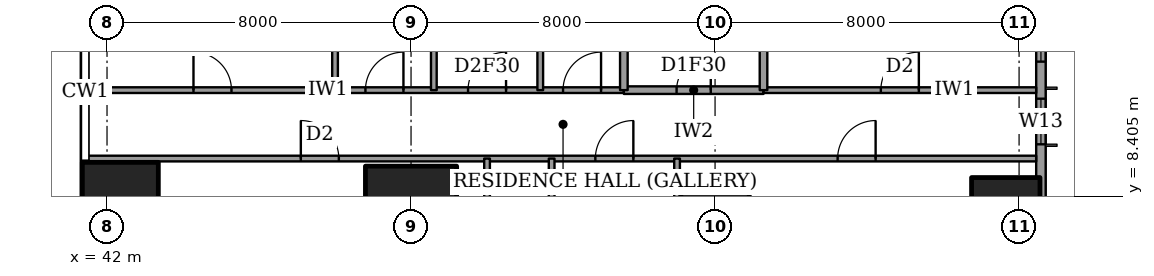
"""IFC4 building model, lengths in metres.
Left out: names, types, materials, properties, quantities, classifications, styles, units other than length and angle.
Written with IfcOpenShell. Run it as: python <this file> out.ifc"""

import sys

from ifc_helpers import new_model, si_unit, direction, frame, frame_2d, origin, origin_2d, place, context, subcontext, project, spatial, rectangle, extrude, element, fill, save


model = new_model("IFC4")
c1 = context("Model", 3, precision=1e-05, world=origin(), true_north=direction((0.0, 1.0)))
c2 = subcontext(c1, "Body", "Model", "MODEL_VIEW")
j1 = project(units=[si_unit("LENGTHUNIT", "METRE"), si_unit("PLANEANGLEUNIT", "RADIAN")], contexts=[c1])
p1 = place(None, origin())
s1 = spatial("IfcSite", under=j1, at=p1, CompositionType="ELEMENT")
p2 = place(p1, origin())
s2 = spatial("IfcBuilding", under=s1, at=p2, CompositionType="ELEMENT")
p3 = place(p2, frame((0.0, 0.0, 203.8)))
s3 = spatial("IfcBuildingStorey", under=s2, at=p3, CompositionType="ELEMENT", Elevation=203.8)
p4 = place(p3, frame((42.35, 8.0, 0.0), z_axis=(0.0, 0.0, 1.0), x_axis=(1.0, 0.0, 0.0)))
e1 = element("IfcColumn", 1, at=p4, inside=s3, PredefinedType="COLUMN", context=c2, shape_type="SweptSolid", body=[
    extrude(rectangle(XDim=2.0, YDim=2.6, at=origin_2d()), origin(), (0.0, 0.0, 1.0), 3.6),
])
p5 = place(p3, frame((50.0, 8.0, 0.0), z_axis=(0.0, 0.0, 1.0), x_axis=(1.0, 0.0, 0.0)))
e2 = element("IfcColumn", 2, at=p5, inside=s3, PredefinedType="COLUMN", context=c2, shape_type="SweptSolid", body=[
    extrude(rectangle(XDim=2.4, YDim=2.4, at=origin_2d()), origin(), (0.0, 0.0, 1.0), 3.6),
])
for number, where, z_axis, x_axis in (
    (3, (58.0, 8.0, 0.0), (0.0, 0.0, 1.0), (1.0, 0.0, 0.0)),
    (4, (65.65, 8.0, 0.0), (0.0, 0.0, 1.0), (1.0, 0.0, 0.0)),
):
    element("IfcColumn", number, at=place(p3, frame(where, z_axis=z_axis, x_axis=x_axis)), inside=s3, PredefinedType="COLUMN", context=c2, shape_type="SweptSolid", body=[
        extrude(rectangle(XDim=1.8, YDim=1.8, at=origin_2d()), origin(), (0.0, 0.0, 1.0), 3.6),
    ])
p6 = place(p3, frame((66.575, 3.175, 0.0), z_axis=(0.0, 0.0, 1.0), x_axis=(0.0, 1.0, 0.0)))
e5 = element("IfcWall", 5, at=p6, inside=s3, PredefinedType="SOLIDWALL", context=c2, shape_type="SweptSolid", body=[
    extrude(rectangle(XDim=41.65, YDim=0.25, at=frame_2d((20.825, 0.0))), origin(), (0.0, 0.0, 1.0), 3.6),
])
p7 = place(p6, frame((0.825, 0.0, 0.2)))
e6 = element("IfcOpeningElement", 6, at=p7, cuts=e5, PredefinedType="OPENING", context=c2, shape_type="SweptSolid", body=[
    extrude(rectangle(XDim=2.4, YDim=2.4, at=frame_2d((1.2, 1.2))), frame((0.0, 0.135, 0.0), z_axis=(0.0, -1.0, 0.0), x_axis=(1.0, 0.0, 0.0)), (0.0, 0.0, 1.0), 0.27),
])
p8 = place(p6, frame((6.6, 0.0, 0.2)))
e7 = element("IfcOpeningElement", 7, at=p8, cuts=e5, PredefinedType="OPENING", context=c2, shape_type="SweptSolid", body=[
    extrude(rectangle(XDim=1.2, YDim=2.4, at=frame_2d((0.6, 1.2))), frame((0.0, 0.135, 0.0), z_axis=(0.0, -1.0, 0.0), x_axis=(1.0, 0.0, 0.0)), (0.0, 0.0, 1.0), 0.27),
])
p9 = place(p6, frame((8.775, 0.0, 0.2)))
e8 = element("IfcOpeningElement", 8, at=p9, cuts=e5, PredefinedType="OPENING", context=c2, shape_type="SweptSolid", body=[
    extrude(rectangle(XDim=2.4, YDim=2.4, at=frame_2d((1.2, 1.2))), frame((0.0, 0.135, 0.0), z_axis=(0.0, -1.0, 0.0), x_axis=(1.0, 0.0, 0.0)), (0.0, 0.0, 1.0), 0.27),
])
p10 = place(p6, frame((15.675, 0.0, 0.2)))
e9 = element("IfcOpeningElement", 9, at=p10, cuts=e5, PredefinedType="OPENING", context=c2, shape_type="SweptSolid", body=[
    extrude(rectangle(XDim=2.4, YDim=2.4, at=frame_2d((1.2, 1.2))), frame((0.0, 0.135, 0.0), z_axis=(0.0, -1.0, 0.0), x_axis=(1.0, 0.0, 0.0)), (0.0, 0.0, 1.0), 0.27),
])
p11 = place(p6, frame((23.575, 0.0, 0.2)))
e10 = element("IfcOpeningElement", 10, at=p11, cuts=e5, PredefinedType="OPENING", context=c2, shape_type="SweptSolid", body=[
    extrude(rectangle(XDim=2.4, YDim=2.4, at=frame_2d((1.2, 1.2))), frame((0.0, 0.135, 0.0), z_axis=(0.0, -1.0, 0.0), x_axis=(1.0, 0.0, 0.0)), (0.0, 0.0, 1.0), 0.27),
])
p12 = place(p6, frame((30.675, 0.0, 0.2)))
e11 = element("IfcOpeningElement", 11, at=p12, cuts=e5, PredefinedType="OPENING", context=c2, shape_type="SweptSolid", body=[
    extrude(rectangle(XDim=2.4, YDim=2.4, at=frame_2d((1.2, 1.2))), frame((0.0, 0.135, 0.0), z_axis=(0.0, -1.0, 0.0), x_axis=(1.0, 0.0, 0.0)), (0.0, 0.0, 1.0), 0.27),
])
p13 = place(p6, frame((34.325, 0.0, 0.2)))
e12 = element("IfcOpeningElement", 12, at=p13, cuts=e5, PredefinedType="OPENING", context=c2, shape_type="SweptSolid", body=[
    extrude(rectangle(XDim=1.2, YDim=2.4, at=frame_2d((0.6, 1.2))), frame((0.0, 0.135, 0.0), z_axis=(0.0, -1.0, 0.0), x_axis=(1.0, 0.0, 0.0)), (0.0, 0.0, 1.0), 0.27),
])
p14 = place(p6, frame((38.425, 0.0, 0.2)))
e13 = element("IfcOpeningElement", 13, at=p14, cuts=e5, PredefinedType="OPENING", context=c2, shape_type="SweptSolid", body=[
    extrude(rectangle(XDim=2.4, YDim=2.4, at=frame_2d((1.2, 1.2))), frame((0.0, 0.135, 0.0), z_axis=(0.0, -1.0, 0.0), x_axis=(1.0, 0.0, 0.0)), (0.0, 0.0, 1.0), 0.27),
])
p15 = place(p3, frame((41.439, 9.4, 0.0), z_axis=(0.0, 0.0, 1.0), x_axis=(1.0, 0.0, 0.0)))
e14 = element("IfcWall", 14, at=p15, inside=s3, PredefinedType="PARTITIONING", context=c2, shape_type="SweptSolid", body=[
    extrude(rectangle(XDim=25.011, YDim=0.15, at=frame_2d((12.505, 0.0))), origin(), (0.0, 0.0, 1.0), 3.35),
])
p16 = place(p15, frame((19.786, 0.0, 0.0)))
e15 = element("IfcOpeningElement", 15, at=p16, cuts=e14, PredefinedType="OPENING", context=c2, shape_type="SweptSolid", body=[
    extrude(rectangle(XDim=1.0, YDim=2.1, at=frame_2d((0.5, 1.05))), frame((0.0, 0.085, 0.0), z_axis=(0.0, -1.0, 0.0), x_axis=(1.0, 0.0, 0.0)), (0.0, 0.0, 1.0), 0.17),
])
p17 = place(p15, frame((13.411, 0.0, 0.0)))
e16 = element("IfcOpeningElement", 16, at=p17, cuts=e14, PredefinedType="OPENING", context=c2, shape_type="SweptSolid", body=[
    extrude(rectangle(XDim=1.0, YDim=2.1, at=frame_2d((0.5, 1.05))), frame((0.0, 0.085, 0.0), z_axis=(0.0, -1.0, 0.0), x_axis=(1.0, 0.0, 0.0)), (0.0, 0.0, 1.0), 0.17),
])
p18 = place(p15, frame((5.661, 0.0, 0.0)))
e17 = element("IfcOpeningElement", 17, at=p18, cuts=e14, PredefinedType="OPENING", context=c2, shape_type="SweptSolid", body=[
    extrude(rectangle(XDim=1.0, YDim=2.1, at=frame_2d((0.5, 1.05))), frame((0.0, 0.085, 0.0), z_axis=(0.0, -1.0, 0.0), x_axis=(1.0, 0.0, 0.0)), (0.0, 0.0, 1.0), 0.17),
])
p19 = place(p3, frame((55.6, 11.2, 0.0), z_axis=(0.0, 0.0, 1.0), x_axis=(1.0, 0.0, 0.0)))
e18 = element("IfcWall", 18, at=p19, inside=s3, PredefinedType="PARTITIONING", context=c2, shape_type="SweptSolid", body=[
    extrude(rectangle(XDim=3.675, YDim=0.2, at=frame_2d((1.837, 0.0))), origin(), (0.0, 0.0, 1.0), 3.35),
])
p20 = place(p19, frame((1.387, 0.0, 0.0)))
e19 = element("IfcOpeningElement", 19, at=p20, cuts=e18, PredefinedType="OPENING", context=c2, shape_type="SweptSolid", body=[
    extrude(rectangle(XDim=0.9, YDim=2.1, at=frame_2d((0.45, 1.05))), frame((0.0, 0.11, 0.0), z_axis=(0.0, -1.0, 0.0), x_axis=(1.0, 0.0, 0.0)), (0.0, 0.0, 1.0), 0.22),
])
p21 = place(p3, frame((41.439, 11.2, 0.0), z_axis=(0.0, 0.0, 1.0), x_axis=(1.0, 0.0, 0.0)))
e20 = element("IfcWall", 20, at=p21, inside=s3, PredefinedType="PARTITIONING", context=c2, shape_type="SweptSolid", body=[
    extrude(rectangle(XDim=14.161, YDim=0.15, at=frame_2d((7.081, 0.0))), origin(), (0.0, 0.0, 1.0), 3.35),
])
p22 = place(p21, frame((12.561, 0.0, 0.0)))
e21 = element("IfcOpeningElement", 21, at=p22, cuts=e20, PredefinedType="OPENING", context=c2, shape_type="SweptSolid", body=[
    extrude(rectangle(XDim=1.0, YDim=2.1, at=frame_2d((0.5, 1.05))), frame((0.0, 0.085, 0.0), z_axis=(0.0, -1.0, 0.0), x_axis=(1.0, 0.0, 0.0)), (0.0, 0.0, 1.0), 0.17),
])
p23 = place(p21, frame((10.061, 0.0, 0.0)))
e22 = element("IfcOpeningElement", 22, at=p23, cuts=e20, PredefinedType="OPENING", context=c2, shape_type="SweptSolid", body=[
    extrude(rectangle(XDim=1.0, YDim=2.1, at=frame_2d((0.5, 1.05))), frame((0.0, 0.085, 0.0), z_axis=(0.0, -1.0, 0.0), x_axis=(1.0, 0.0, 0.0)), (0.0, 0.0, 1.0), 0.17),
])
p24 = place(p21, frame((7.361, 0.0, 0.0)))
e23 = element("IfcOpeningElement", 23, at=p24, cuts=e20, PredefinedType="OPENING", context=c2, shape_type="SweptSolid", body=[
    extrude(rectangle(XDim=1.0, YDim=2.1, at=frame_2d((0.5, 1.05))), frame((0.0, 0.085, 0.0), z_axis=(0.0, -1.0, 0.0), x_axis=(1.0, 0.0, 0.0)), (0.0, 0.0, 1.0), 0.17),
])
p25 = place(p21, frame((2.836, 0.0, 0.0)))
e24 = element("IfcOpeningElement", 24, at=p25, cuts=e20, PredefinedType="OPENING", context=c2, shape_type="SweptSolid", body=[
    extrude(rectangle(XDim=1.0, YDim=2.1, at=frame_2d((0.5, 1.05))), frame((0.0, 0.085, 0.0), z_axis=(0.0, -1.0, 0.0), x_axis=(1.0, 0.0, 0.0)), (0.0, 0.0, 1.0), 0.17),
])
p26 = place(p3, frame((59.275, 11.2, 0.0), z_axis=(0.0, 0.0, 1.0), x_axis=(1.0, 0.0, 0.0)))
e25 = element("IfcWall", 25, at=p26, inside=s3, PredefinedType="PARTITIONING", context=c2, shape_type="SweptSolid", body=[
    extrude(rectangle(XDim=7.175, YDim=0.15, at=frame_2d((3.587, 0.0))), origin(), (0.0, 0.0, 1.0), 3.35),
])
p27 = place(p26, frame((3.087, 0.0, 0.0)))
e26 = element("IfcOpeningElement", 26, at=p27, cuts=e25, PredefinedType="OPENING", context=c2, shape_type="SweptSolid", body=[
    extrude(rectangle(XDim=1.0, YDim=2.1, at=frame_2d((0.5, 1.05))), frame((0.0, 0.085, 0.0), z_axis=(0.0, -1.0, 0.0), x_axis=(1.0, 0.0, 0.0)), (0.0, 0.0, 1.0), 0.17),
])
p28 = place(p3, frame((48.0, 11.2, 0.0), z_axis=(0.0, 0.0, 1.0), x_axis=(0.0, 1.0, 0.0)))
e27 = element("IfcWall", 27, at=p28, inside=s3, PredefinedType="PARTITIONING", context=c2, shape_type="SweptSolid", body=[
    extrude(rectangle(XDim=6.8, YDim=0.15, at=frame_2d((3.4, 0.0))), origin(), (0.0, 0.0, 1.0), 3.35),
])
p29 = place(p3, frame((50.6, 11.2, 0.0), z_axis=(0.0, 0.0, 1.0), x_axis=(0.0, 1.0, 0.0)))
e28 = element("IfcWall", 28, at=p29, inside=s3, PredefinedType="PARTITIONING", context=c2, shape_type="SweptSolid", body=[
    extrude(rectangle(XDim=3.6, YDim=0.15, at=frame_2d((1.8, 0.0))), origin(), (0.0, 0.0, 1.0), 3.35),
])
p30 = place(p3, frame((52.0, -0.45, 0.0), z_axis=(0.0, 0.0, 1.0), x_axis=(0.0, 1.0, 0.0)))
e29 = element("IfcWall", 29, at=p30, inside=s3, PredefinedType="PARTITIONING", context=c2, shape_type="SweptSolid", body=[
    extrude(rectangle(XDim=9.85, YDim=0.15, at=frame_2d((4.925, 0.0))), origin(), (0.0, 0.0, 1.0), 3.35),
])
p31 = place(p3, frame((53.4, 11.2, 0.0), z_axis=(0.0, 0.0, 1.0), x_axis=(0.0, 1.0, 0.0)))
e30 = element("IfcWall", 30, at=p31, inside=s3, PredefinedType="PARTITIONING", context=c2, shape_type="SweptSolid", body=[
    extrude(rectangle(XDim=6.8, YDim=0.15, at=frame_2d((3.4, 0.0))), origin(), (0.0, 0.0, 1.0), 3.35),
])
p32 = place(p3, frame((53.7, -0.45, 0.0), z_axis=(0.0, 0.0, 1.0), x_axis=(0.0, 1.0, 0.0)))
e31 = element("IfcWall", 31, at=p32, inside=s3, PredefinedType="PARTITIONING", context=c2, shape_type="SweptSolid", body=[
    extrude(rectangle(XDim=9.85, YDim=0.15, at=frame_2d((4.925, 0.0))), origin(), (0.0, 0.0, 1.0), 3.35),
])
p33 = place(p32, frame((4.475, 0.0, 0.0)))
e32 = element("IfcOpeningElement", 32, at=p33, cuts=e31, PredefinedType="OPENING", context=c2, shape_type="SweptSolid", body=[
    extrude(rectangle(XDim=0.9, YDim=2.1, at=frame_2d((0.45, 1.05))), frame((0.0, 0.085, 0.0), z_axis=(0.0, -1.0, 0.0), x_axis=(1.0, 0.0, 0.0)), (0.0, 0.0, 1.0), 0.17),
])
p34 = place(p3, frame((55.6, 11.2, 0.0), z_axis=(0.0, 0.0, 1.0), x_axis=(0.0, 1.0, 0.0)))
e33 = element("IfcWall", 33, at=p34, inside=s3, PredefinedType="PARTITIONING", context=c2, shape_type="SweptSolid", body=[
    extrude(rectangle(XDim=3.4, YDim=0.2, at=frame_2d((1.7, 0.0))), origin(), (0.0, 0.0, 1.0), 3.35),
])
p35 = place(p3, frame((57.0, -0.45, 0.0), z_axis=(0.0, 0.0, 1.0), x_axis=(0.0, 1.0, 0.0)))
e34 = element("IfcWall", 34, at=p35, inside=s3, PredefinedType="PARTITIONING", context=c2, shape_type="SweptSolid", body=[
    extrude(rectangle(XDim=9.85, YDim=0.15, at=frame_2d((4.925, 0.0))), origin(), (0.0, 0.0, 1.0), 3.35),
])
p36 = place(p3, frame((59.275, 11.2, 0.0), z_axis=(0.0, 0.0, 1.0), x_axis=(0.0, 1.0, 0.0)))
e35 = element("IfcWall", 35, at=p36, inside=s3, PredefinedType="PARTITIONING", context=c2, shape_type="SweptSolid", body=[
    extrude(rectangle(XDim=3.4, YDim=0.2, at=frame_2d((1.7, 0.0))), origin(), (0.0, 0.0, 1.0), 3.35),
])
p37 = place(p8, origin())
e36 = element("IfcWindow", 36, at=p37, inside=s3, PartitioningType="SINGLE_PANEL", PredefinedType="WINDOW", context=c2, shape_type="SweptSolid", body=[
    extrude(rectangle(XDim=1.2, YDim=2.4, at=frame_2d((0.6, 1.2))), frame((0.0, 0.03, 0.0), z_axis=(0.0, -1.0, 0.0), x_axis=(1.0, 0.0, 0.0)), (0.0, 0.0, 1.0), 0.06),
])
fill(e7, e36)
p38 = place(p9, origin())
e37 = element("IfcWindow", 37, at=p38, inside=s3, PartitioningType="SINGLE_PANEL", PredefinedType="WINDOW", context=c2, shape_type="SweptSolid", body=[
    extrude(rectangle(XDim=2.4, YDim=2.4, at=frame_2d((1.2, 1.2))), frame((0.0, 0.03, 0.0), z_axis=(0.0, -1.0, 0.0), x_axis=(1.0, 0.0, 0.0)), (0.0, 0.0, 1.0), 0.06),
])
fill(e8, e37)
p39 = place(p16, origin())
e38 = element("IfcDoor", 38, at=p39, inside=s3, OperationType="SINGLE_SWING_LEFT", PredefinedType="DOOR", context=c2, shape_type="SweptSolid", body=[
    extrude(rectangle(XDim=1.0, YDim=2.1, at=frame_2d((0.5, 1.05))), frame((0.0, 0.025, 0.0), z_axis=(0.0, -1.0, 0.0), x_axis=(1.0, 0.0, 0.0)), (0.0, 0.0, 1.0), 0.05),
])
fill(e15, e38)
p40 = place(p17, origin())
e39 = element("IfcDoor", 39, at=p40, inside=s3, OperationType="SINGLE_SWING_LEFT", PredefinedType="DOOR", context=c2, shape_type="SweptSolid", body=[
    extrude(rectangle(XDim=1.0, YDim=2.1, at=frame_2d((0.5, 1.05))), frame((0.0, 0.025, 0.0), z_axis=(0.0, -1.0, 0.0), x_axis=(1.0, 0.0, 0.0)), (0.0, 0.0, 1.0), 0.05),
])
fill(e16, e39)
p41 = place(p18, origin())
e40 = element("IfcDoor", 40, at=p41, inside=s3, OperationType="SINGLE_SWING_RIGHT", PredefinedType="DOOR", context=c2, shape_type="SweptSolid", body=[
    extrude(rectangle(XDim=1.0, YDim=2.1, at=frame_2d((0.5, 1.05))), frame((0.0, 0.025, 0.0), z_axis=(0.0, -1.0, 0.0), x_axis=(1.0, 0.0, 0.0)), (0.0, 0.0, 1.0), 0.05),
])
fill(e17, e40)
p42 = place(p22, origin())
e41 = element("IfcDoor", 41, at=p42, inside=s3, OperationType="SINGLE_SWING_LEFT", PredefinedType="DOOR", context=c2, shape_type="SweptSolid", body=[
    extrude(rectangle(XDim=1.0, YDim=2.1, at=frame_2d((0.5, 1.05))), frame((0.0, 0.025, 0.0), z_axis=(0.0, -1.0, 0.0), x_axis=(1.0, 0.0, 0.0)), (0.0, 0.0, 1.0), 0.05),
])
fill(e21, e41)
p43 = place(p27, origin())
e42 = element("IfcDoor", 42, at=p43, inside=s3, OperationType="SINGLE_SWING_LEFT", PredefinedType="DOOR", context=c2, shape_type="SweptSolid", body=[
    extrude(rectangle(XDim=1.0, YDim=2.1, at=frame_2d((0.5, 1.05))), frame((0.0, 0.025, 0.0), z_axis=(0.0, -1.0, 0.0), x_axis=(1.0, 0.0, 0.0)), (0.0, 0.0, 1.0), 0.05),
])
fill(e26, e42)
p44 = place(p20, origin())
e43 = element("IfcDoor", 43, at=p44, inside=s3, OperationType="SINGLE_SWING_LEFT", PredefinedType="DOOR", context=c2, shape_type="SweptSolid", body=[
    extrude(rectangle(XDim=0.9, YDim=2.1, at=frame_2d((0.45, 1.05))), frame((0.0, 0.025, 0.0), z_axis=(0.0, -1.0, 0.0), x_axis=(1.0, 0.0, 0.0)), (0.0, 0.0, 1.0), 0.05),
])
fill(e19, e43)
p45 = place(p23, origin())
e44 = element("IfcDoor", 44, at=p45, inside=s3, OperationType="SINGLE_SWING_LEFT", PredefinedType="DOOR", context=c2, shape_type="SweptSolid", body=[
    extrude(rectangle(XDim=1.0, YDim=2.1, at=frame_2d((0.5, 1.05))), frame((0.0, 0.025, 0.0), z_axis=(0.0, -1.0, 0.0), x_axis=(1.0, 0.0, 0.0)), (0.0, 0.0, 1.0), 0.05),
])
fill(e22, e44)
p46 = place(p24, origin())
e45 = element("IfcDoor", 45, at=p46, inside=s3, OperationType="SINGLE_SWING_LEFT", PredefinedType="DOOR", context=c2, shape_type="SweptSolid", body=[
    extrude(rectangle(XDim=1.0, YDim=2.1, at=frame_2d((0.5, 1.05))), frame((0.0, 0.025, 0.0), z_axis=(0.0, -1.0, 0.0), x_axis=(1.0, 0.0, 0.0)), (0.0, 0.0, 1.0), 0.05),
])
fill(e23, e45)
p47 = place(p25, origin())
e46 = element("IfcDoor", 46, at=p47, inside=s3, OperationType="SINGLE_SWING_RIGHT", PredefinedType="DOOR", context=c2, shape_type="SweptSolid", body=[
    extrude(rectangle(XDim=1.0, YDim=2.1, at=frame_2d((0.5, 1.05))), frame((0.0, 0.025, 0.0), z_axis=(0.0, -1.0, 0.0), x_axis=(1.0, 0.0, 0.0)), (0.0, 0.0, 1.0), 0.05),
])
fill(e24, e46)
save(model, sys.argv[1])
